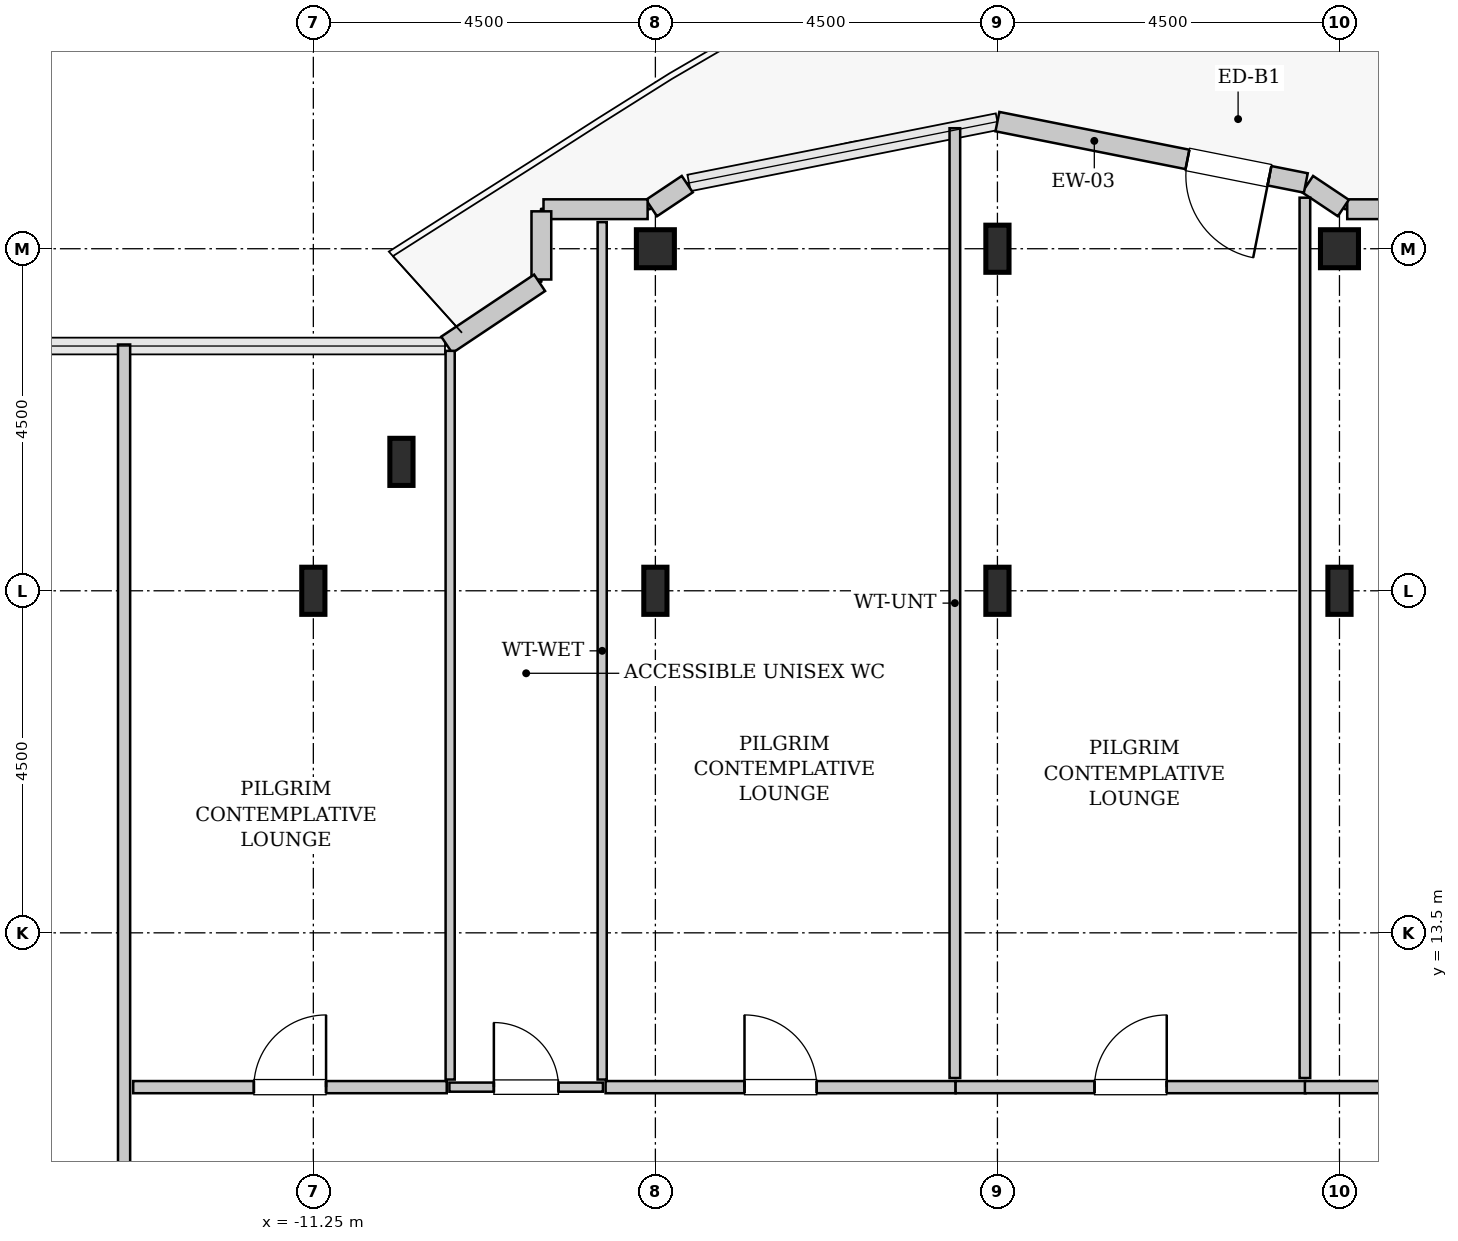
"""IFC4 building model, lengths in metres.
Left out: names, types, materials, properties, quantities, classifications, styles, units other than length and angle.
Written with IfcOpenShell. Run it as: python <this file> out.ifc"""

import sys

from ifc_helpers import new_model, si_unit, direction, frame, frame_2d, origin, origin_2d, place, context, subcontext, project, spatial, rectangle, hollow_rectangle, i_section, extrude, source, transform, mapped, element, fill, save


model = new_model("IFC4")
c1 = context("Model", 3, precision=1e-05, world=origin(), true_north=direction((0.0, 1.0)))
c2 = subcontext(c1, "Body", "Model", "MODEL_VIEW")
j1 = project(units=[si_unit("LENGTHUNIT", "METRE"), si_unit("PLANEANGLEUNIT", "RADIAN")], contexts=[c1])
p1 = place(None, origin())
s1 = spatial("IfcSite", under=j1, at=p1, CompositionType="ELEMENT")
p2 = place(p1, origin())
s2 = spatial("IfcBuilding", under=s1, at=p2, CompositionType="ELEMENT")
p3 = place(p2, frame((0.0, 0.0, 295.0)))
s3 = spatial("IfcBuildingStorey", under=s2, at=p3, CompositionType="ELEMENT", Elevation=295.0)
m1 = source(origin(), c2, "Body", "SweptSolid", [
    extrude(i_section(OverallWidth=0.305, OverallDepth=0.62, WebThickness=0.021, FlangeThickness=0.04, FilletRadius=0.027, at=origin_2d()), origin(), (0.0, 0.0, 1.0), 3.8),
])
for number, where, z_axis, x_axis in (
    (1, (-11.25, 18.0, 0.0), (0.0, 0.0, 1.0), (1.0, 0.0, 0.0)),
    (2, (-10.091, 19.696, 0.0), (0.0, 0.0, 1.0), (1.0, 0.0, 0.0)),
    (3, (-6.75, 18.0, 0.0), (0.0, 0.0, 1.0), (1.0, 0.0, 0.0)),
):
    element("IfcColumn", number, at=place(p3, frame(where, z_axis=z_axis, x_axis=x_axis)), inside=s3, PredefinedType="COLUMN", context=c2, shape_type="MappedRepresentation", body=[
        mapped(m1, transform((0.0, 0.0, 0.0), x_axis=(1.0, 0.0, 0.0), y_axis=(0.0, 1.0, 0.0), z_axis=(0.0, 0.0, 1.0), scale=1.0)),
    ])
m2 = source(origin(), c2, "Body", "SweptSolid", [
    extrude(hollow_rectangle(XDim=0.5, YDim=0.5, WallThickness=0.025, InnerFilletRadius=0.025, OuterFilletRadius=0.05, at=origin_2d()), origin(), (0.0, 0.0, 1.0), 3.8),
])
p4 = place(p3, frame((-6.75, 22.5, 0.0), z_axis=(0.0, 0.0, 1.0), x_axis=(1.0, 0.0, 0.0)))
e4 = element("IfcColumn", 4, at=p4, inside=s3, PredefinedType="COLUMN", context=c2, shape_type="MappedRepresentation", body=[
    mapped(m2, transform((0.0, 0.0, 0.0), x_axis=(1.0, 0.0, 0.0), y_axis=(0.0, 1.0, 0.0), z_axis=(0.0, 0.0, 1.0), scale=1.0)),
])
for number, where, z_axis, x_axis in (
    (5, (-2.25, 18.0, 0.0), (0.0, 0.0, 1.0), (1.0, 0.0, 0.0)),
    (6, (-2.25, 22.5, 0.0), (0.0, 0.0, 1.0), (1.0, 0.0, 0.0)),
    (7, (2.25, 18.0, 0.0), (0.0, 0.0, 1.0), (1.0, 0.0, 0.0)),
):
    element("IfcColumn", number, at=place(p3, frame(where, z_axis=z_axis, x_axis=x_axis)), inside=s3, PredefinedType="COLUMN", context=c2, shape_type="MappedRepresentation", body=[
        mapped(m1, transform((0.0, 0.0, 0.0), x_axis=(1.0, 0.0, 0.0), y_axis=(0.0, 1.0, 0.0), z_axis=(0.0, 0.0, 1.0), scale=1.0)),
    ])
p5 = place(p3, frame((2.25, 22.5, 0.0), z_axis=(0.0, 0.0, 1.0), x_axis=(1.0, 0.0, 0.0)))
e8 = element("IfcColumn", 8, at=p5, inside=s3, PredefinedType="COLUMN", context=c2, shape_type="MappedRepresentation", body=[
    mapped(m2, transform((0.0, 0.0, 0.0), x_axis=(1.0, 0.0, 0.0), y_axis=(0.0, 1.0, 0.0), z_axis=(0.0, 0.0, 1.0), scale=1.0)),
])
m3 = source(origin(), c2, "Body", "SweptSolid", [
    extrude(rectangle(XDim=1.37, YDim=0.26, at=frame_2d((0.685, 0.0))), origin(), (0.0, 0.0, 1.0), 3.55),
])
p6 = place(p3, frame((3.722, 23.02, 0.0), z_axis=(0.0, 0.0, 1.0), x_axis=(-1.0, 0.0, 0.0)))
e9 = element("IfcWall", 9, at=p6, inside=s3, PredefinedType="SOLIDWALL", context=c2, shape_type="MappedRepresentation", body=[
    mapped(m3, transform((0.0, 0.0, 0.0), x_axis=(1.0, 0.0, 0.0), y_axis=(0.0, 1.0, 0.0), z_axis=(0.0, 0.0, 1.0), scale=1.0)),
])
m4 = source(origin(), c2, "Body", "SweptSolid", [
    extrude(rectangle(XDim=0.565, YDim=0.26, at=frame_2d((0.283, 0.0))), origin(), (0.0, 0.0, 1.0), 3.55),
])
p7 = place(p3, frame((2.301, 23.036, 0.0), z_axis=(0.0, 0.0, 1.0), x_axis=(-0.831651492666, 0.555297933317, 0.0)))
e10 = element("IfcWall", 10, at=p7, inside=s3, PredefinedType="SOLIDWALL", context=c2, shape_type="MappedRepresentation", body=[
    mapped(m4, transform((0.0, 0.0, 0.0), x_axis=(1.0, 0.0, 0.0), y_axis=(0.0, 1.0, 0.0), z_axis=(0.0, 0.0, 1.0), scale=1.0)),
])
m5 = source(origin(), c2, "Body", "SweptSolid", [
    extrude(rectangle(XDim=4.137, YDim=0.26, at=frame_2d((2.068, 0.0))), origin(), (0.0, 0.0, 1.0), 3.55),
])
p8 = place(p3, frame((1.807, 23.365, 0.0), z_axis=(0.0, 0.0, 1.0), x_axis=(-0.980782170794, 0.195105954428, 0.0)))
e11 = element("IfcWall", 11, at=p8, inside=s3, PredefinedType="SOLIDWALL", context=c2, shape_type="MappedRepresentation", body=[
    mapped(m5, transform((0.0, 0.0, 0.0), x_axis=(1.0, 0.0, 0.0), y_axis=(0.0, 1.0, 0.0), z_axis=(0.0, 0.0, 1.0), scale=1.0)),
])
p9 = place(p8, frame((0.488, 0.0, 0.0)))
e12 = element("IfcOpeningElement", 12, at=p9, cuts=e11, PredefinedType="OPENING", context=c2, shape_type="SweptSolid", body=[
    extrude(rectangle(XDim=1.1, YDim=2.2, at=frame_2d((0.55, 1.1))), frame((0.0, 0.14, 0.0), z_axis=(0.0, -1.0, 0.0), x_axis=(1.0, 0.0, 0.0)), (0.0, 0.0, 1.0), 0.28),
])
p10 = place(p3, frame((-6.331, 23.35, 0.0), z_axis=(0.0, 0.0, 1.0), x_axis=(-0.831651492666, -0.555297933317, 0.0)))
e13 = element("IfcWall", 13, at=p10, inside=s3, PredefinedType="SOLIDWALL", context=c2, shape_type="MappedRepresentation", body=[
    mapped(m4, transform((0.0, 0.0, 0.0), x_axis=(1.0, 0.0, 0.0), y_axis=(0.0, 1.0, 0.0), z_axis=(0.0, 0.0, 1.0), scale=1.0)),
])
p11 = place(p3, frame((-6.852, 23.02, 0.0), z_axis=(0.0, 0.0, 1.0), x_axis=(-1.0, 0.0, 0.0)))
e14 = element("IfcWall", 14, at=p11, inside=s3, PredefinedType="SOLIDWALL", context=c2, shape_type="MappedRepresentation", body=[
    mapped(m3, transform((0.0, 0.0, 0.0), x_axis=(1.0, 0.0, 0.0), y_axis=(0.0, 1.0, 0.0), z_axis=(0.0, 0.0, 1.0), scale=1.0)),
])
m6 = source(origin(), c2, "Body", "SweptSolid", [
    extrude(rectangle(XDim=0.897, YDim=0.26, at=frame_2d((0.448, 0.0))), origin(), (0.0, 0.0, 1.0), 3.55),
])
p12 = place(p3, frame((-8.25, 22.992, 0.0), z_axis=(0.0, 0.0, 1.0), x_axis=(0.0, -1.0, 0.0)))
e15 = element("IfcWall", 15, at=p12, inside=s3, PredefinedType="SOLIDWALL", context=c2, shape_type="MappedRepresentation", body=[
    mapped(m6, transform((0.0, 0.0, 0.0), x_axis=(1.0, 0.0, 0.0), y_axis=(0.0, 1.0, 0.0), z_axis=(0.0, 0.0, 1.0), scale=1.0)),
])
m7 = source(origin(), c2, "Body", "SweptSolid", [
    extrude(rectangle(XDim=1.469, YDim=0.26, at=frame_2d((0.734, 0.0))), origin(), (0.0, 0.0, 1.0), 3.55),
])
p13 = place(p3, frame((-8.273, 22.052, 0.0), z_axis=(0.0, 0.0, 1.0), x_axis=(-0.831461760506, -0.555581983884, 0.0)))
e16 = element("IfcWall", 16, at=p13, inside=s3, PredefinedType="SOLIDWALL", context=c2, shape_type="MappedRepresentation", body=[
    mapped(m7, transform((0.0, 0.0, 0.0), x_axis=(1.0, 0.0, 0.0), y_axis=(0.0, 1.0, 0.0), z_axis=(0.0, 0.0, 1.0), scale=1.0)),
])
m8 = source(origin(), c2, "Body", "SweptSolid", [
    extrude(rectangle(XDim=2.02, YDim=0.12, at=frame_2d((1.01, 0.0))), origin(), (0.0, 0.0, 1.0), 3.535),
])
p14 = place(p3, frame((-9.46, 11.47, 0.0), z_axis=(0.0, 0.0, 1.0), x_axis=(1.0, 0.0, 0.0)))
e17 = element("IfcWall", 17, at=p14, inside=s3, PredefinedType="PLUMBINGWALL", context=c2, shape_type="MappedRepresentation", body=[
    mapped(m8, transform((0.0, 0.0, 0.0), x_axis=(1.0, 0.0, 0.0), y_axis=(0.0, 1.0, 0.0), z_axis=(0.0, 0.0, 1.0), scale=1.0)),
])
p15 = place(p14, frame((0.585, 0.0, 0.0)))
e18 = element("IfcOpeningElement", 18, at=p15, cuts=e17, PredefinedType="OPENING", context=c2, shape_type="SweptSolid", body=[
    extrude(rectangle(XDim=0.85, YDim=2.1, at=frame_2d((0.425, 1.05))), frame((0.0, 0.07, 0.0), z_axis=(0.0, -1.0, 0.0), x_axis=(1.0, 0.0, 0.0)), (0.0, 0.0, 1.0), 0.14),
])
m9 = source(origin(), c2, "Body", "SweptSolid", [
    extrude(rectangle(XDim=11.28, YDim=0.12, at=frame_2d((5.64, 0.0))), origin(), (0.0, 0.0, 1.0), 3.535),
])
p16 = place(p3, frame((-7.45, 11.57, 0.0), z_axis=(0.0, 0.0, 1.0), x_axis=(0.0, 1.0, 0.0)))
e19 = element("IfcWall", 19, at=p16, inside=s3, PredefinedType="PLUMBINGWALL", context=c2, shape_type="MappedRepresentation", body=[
    mapped(m9, transform((0.0, 0.0, 0.0), x_axis=(1.0, 0.0, 0.0), y_axis=(0.0, 1.0, 0.0), z_axis=(0.0, 0.0, 1.0), scale=1.0)),
])
m10 = source(origin(), c2, "Body", "SweptSolid", [
    extrude(rectangle(XDim=9.587, YDim=0.12, at=frame_2d((4.793, 0.0))), origin(), (0.0, 0.0, 1.0), 3.535),
])
p17 = place(p3, frame((-9.45, 11.57, 0.0), z_axis=(0.0, 0.0, 1.0), x_axis=(0.0, 1.0, 0.0)))
e20 = element("IfcWall", 20, at=p17, inside=s3, PredefinedType="PLUMBINGWALL", context=c2, shape_type="MappedRepresentation", body=[
    mapped(m10, transform((0.0, 0.0, 0.0), x_axis=(1.0, 0.0, 0.0), y_axis=(0.0, 1.0, 0.0), z_axis=(0.0, 0.0, 1.0), scale=1.0)),
])
m11 = source(origin(), c2, "Body", "SweptSolid", [
    extrude(rectangle(XDim=12.752, YDim=0.16, at=frame_2d((6.376, 0.0))), origin(), (0.0, 0.0, 1.0), 3.535),
])
p18 = place(p3, frame((-13.74, 8.488, 0.0), z_axis=(0.0, 0.0, 1.0), x_axis=(0.0, 1.0, 0.0)))
e21 = element("IfcWall", 21, at=p18, inside=s3, PredefinedType="PARTITIONING", context=c2, shape_type="MappedRepresentation", body=[
    mapped(m11, transform((0.0, 0.0, 0.0), x_axis=(1.0, 0.0, 0.0), y_axis=(0.0, 1.0, 0.0), z_axis=(0.0, 0.0, 1.0), scale=1.0)),
])
p19 = place(p18, frame((1.036, 0.0, 0.0)))
e22 = element("IfcOpeningElement", 22, at=p19, cuts=e21, PredefinedType="OPENING", context=c2, shape_type="SweptSolid", body=[
    extrude(rectangle(XDim=0.95, YDim=2.1, at=frame_2d((0.475, 1.05))), frame((0.0, 0.09, 0.0), z_axis=(0.0, -1.0, 0.0), x_axis=(1.0, 0.0, 0.0)), (0.0, 0.0, 1.0), 0.18),
])
m12 = source(origin(), c2, "Body", "SweptSolid", [
    extrude(rectangle(XDim=4.125, YDim=0.16, at=frame_2d((2.062, 0.0))), origin(), (0.0, 0.0, 1.0), 3.535),
])
p20 = place(p3, frame((-13.62, 11.47, 0.0), z_axis=(0.0, 0.0, 1.0), x_axis=(1.0, 0.0, 0.0)))
e23 = element("IfcWall", 23, at=p20, inside=s3, PredefinedType="PARTITIONING", context=c2, shape_type="MappedRepresentation", body=[
    mapped(m12, transform((0.0, 0.0, 0.0), x_axis=(1.0, 0.0, 0.0), y_axis=(0.0, 1.0, 0.0), z_axis=(0.0, 0.0, 1.0), scale=1.0)),
])
p21 = place(p20, frame((1.587, 0.0, 0.0)))
e24 = element("IfcOpeningElement", 24, at=p21, cuts=e23, PredefinedType="OPENING", context=c2, shape_type="SweptSolid", body=[
    extrude(rectangle(XDim=0.95, YDim=2.1, at=frame_2d((0.475, 1.05))), frame((0.0, 0.09, 0.0), z_axis=(0.0, -1.0, 0.0), x_axis=(1.0, 0.0, 0.0)), (0.0, 0.0, 1.0), 0.18),
])
m13 = source(origin(), c2, "Body", "SweptSolid", [
    extrude(rectangle(XDim=4.605, YDim=0.16, at=frame_2d((2.302, 0.0))), origin(), (0.0, 0.0, 1.0), 3.535),
])
p22 = place(p3, frame((-7.405, 11.47, 0.0), z_axis=(0.0, 0.0, 1.0), x_axis=(1.0, 0.0, 0.0)))
e25 = element("IfcWall", 25, at=p22, inside=s3, PredefinedType="PARTITIONING", context=c2, shape_type="MappedRepresentation", body=[
    mapped(m13, transform((0.0, 0.0, 0.0), x_axis=(1.0, 0.0, 0.0), y_axis=(0.0, 1.0, 0.0), z_axis=(0.0, 0.0, 1.0), scale=1.0)),
])
p23 = place(p22, frame((1.827, 0.0, 0.0)))
e26 = element("IfcOpeningElement", 26, at=p23, cuts=e25, PredefinedType="OPENING", context=c2, shape_type="SweptSolid", body=[
    extrude(rectangle(XDim=0.95, YDim=2.1, at=frame_2d((0.475, 1.05))), frame((0.0, 0.09, 0.0), z_axis=(0.0, -1.0, 0.0), x_axis=(1.0, 0.0, 0.0)), (0.0, 0.0, 1.0), 0.18),
])
m14 = source(origin(), c2, "Body", "SweptSolid", [
    extrude(rectangle(XDim=12.495, YDim=0.14, at=frame_2d((6.248, 0.0))), origin(), (0.0, 0.0, 1.0), 3.535),
])
p24 = place(p3, frame((-2.81, 11.59, 0.0), z_axis=(0.0, 0.0, 1.0), x_axis=(0.0, 1.0, 0.0)))
e27 = element("IfcWall", 27, at=p24, inside=s3, PredefinedType="PARTITIONING", context=c2, shape_type="MappedRepresentation", body=[
    mapped(m14, transform((0.0, 0.0, 0.0), x_axis=(1.0, 0.0, 0.0), y_axis=(0.0, 1.0, 0.0), z_axis=(0.0, 0.0, 1.0), scale=1.0)),
])
p25 = place(p3, frame((-2.8, 11.47, 0.0), z_axis=(0.0, 0.0, 1.0), x_axis=(1.0, 0.0, 0.0)))
e28 = element("IfcWall", 28, at=p25, inside=s3, PredefinedType="PARTITIONING", context=c2, shape_type="MappedRepresentation", body=[
    mapped(m13, transform((0.0, 0.0, 0.0), x_axis=(1.0, 0.0, 0.0), y_axis=(0.0, 1.0, 0.0), z_axis=(0.0, 0.0, 1.0), scale=1.0)),
])
p26 = place(p25, frame((1.827, 0.0, 0.0)))
e29 = element("IfcOpeningElement", 29, at=p26, cuts=e28, PredefinedType="OPENING", context=c2, shape_type="SweptSolid", body=[
    extrude(rectangle(XDim=0.95, YDim=2.1, at=frame_2d((0.475, 1.05))), frame((0.0, 0.09, 0.0), z_axis=(0.0, -1.0, 0.0), x_axis=(1.0, 0.0, 0.0)), (0.0, 0.0, 1.0), 0.18),
])
m15 = source(origin(), c2, "Body", "SweptSolid", [
    extrude(rectangle(XDim=11.581, YDim=0.14, at=frame_2d((5.791, 0.0))), origin(), (0.0, 0.0, 1.0), 2.925),
])
p27 = place(p3, frame((1.795, 11.59, 0.0), z_axis=(0.0, 0.0, 1.0), x_axis=(0.0, 1.0, 0.0)))
e30 = element("IfcWall", 30, at=p27, inside=s3, PredefinedType="PARTITIONING", context=c2, shape_type="MappedRepresentation", body=[
    mapped(m15, transform((0.0, 0.0, 0.0), x_axis=(1.0, 0.0, 0.0), y_axis=(0.0, 1.0, 0.0), z_axis=(0.0, 0.0, 1.0), scale=1.0)),
])
m16 = source(origin(), c2, "Body", "SweptSolid", [
    extrude(rectangle(XDim=6.01, YDim=0.16, at=frame_2d((3.005, 0.0))), origin(), (0.0, 0.0, 1.0), 3.535),
])
p28 = place(p3, frame((1.795, 11.47, 0.0), z_axis=(0.0, 0.0, 1.0), x_axis=(1.0, 0.0, 0.0)))
e31 = element("IfcWall", 31, at=p28, inside=s3, PredefinedType="PARTITIONING", context=c2, shape_type="MappedRepresentation", body=[
    mapped(m16, transform((0.0, 0.0, 0.0), x_axis=(1.0, 0.0, 0.0), y_axis=(0.0, 1.0, 0.0), z_axis=(0.0, 0.0, 1.0), scale=1.0)),
])
p29 = place(p28, frame((2.53, 0.0, 0.0)))
e32 = element("IfcOpeningElement", 32, at=p29, cuts=e31, PredefinedType="OPENING", context=c2, shape_type="SweptSolid", body=[
    extrude(rectangle(XDim=0.95, YDim=2.1, at=frame_2d((0.475, 1.05))), frame((0.0, 0.09, 0.0), z_axis=(0.0, -1.0, 0.0), x_axis=(1.0, 0.0, 0.0)), (0.0, 0.0, 1.0), 0.18),
])
m17 = source(origin(), c2, "Body", "SweptSolid", [
    extrude(rectangle(XDim=1.1, YDim=2.2, at=frame_2d((0.55, 1.1))), frame((0.0, 0.025, 0.0), z_axis=(0.0, -1.0, 0.0), x_axis=(1.0, 0.0, 0.0)), (0.0, 0.0, 1.0), 0.05),
])
p30 = place(p9, origin())
e33 = element("IfcDoor", 33, at=p30, inside=s3, OperationType="SINGLE_SWING_LEFT", PredefinedType="DOOR", context=c2, shape_type="MappedRepresentation", body=[
    mapped(m17, transform((0.0, 0.0, 0.0), x_axis=(1.0, 0.0, 0.0), y_axis=(0.0, 1.0, 0.0), z_axis=(0.0, 0.0, 1.0), scale=1.0)),
])
fill(e12, e33)
m18 = source(origin(), c2, "Body", "SweptSolid", [
    extrude(rectangle(XDim=0.85, YDim=2.1, at=frame_2d((0.425, 1.05))), frame((0.0, 0.025, 0.0), z_axis=(0.0, -1.0, 0.0), x_axis=(1.0, 0.0, 0.0)), (0.0, 0.0, 1.0), 0.05),
])
p31 = place(p15, origin())
e34 = element("IfcDoor", 34, at=p31, inside=s3, OperationType="SINGLE_SWING_LEFT", PredefinedType="DOOR", context=c2, shape_type="MappedRepresentation", body=[
    mapped(m18, transform((0.0, 0.0, 0.0), x_axis=(1.0, 0.0, 0.0), y_axis=(0.0, 1.0, 0.0), z_axis=(0.0, 0.0, 1.0), scale=1.0)),
])
fill(e18, e34)
m19 = source(origin(), c2, "Body", "SweptSolid", [
    extrude(rectangle(XDim=0.95, YDim=2.1, at=frame_2d((0.475, 1.05))), frame((0.0, 0.025, 0.0), z_axis=(0.0, -1.0, 0.0), x_axis=(1.0, 0.0, 0.0)), (0.0, 0.0, 1.0), 0.05),
])
p32 = place(p21, origin())
e35 = element("IfcDoor", 35, at=p32, inside=s3, OperationType="SINGLE_SWING_RIGHT", PredefinedType="DOOR", context=c2, shape_type="MappedRepresentation", body=[
    mapped(m19, transform((0.0, 0.0, 0.0), x_axis=(1.0, 0.0, 0.0), y_axis=(0.0, 1.0, 0.0), z_axis=(0.0, 0.0, 1.0), scale=1.0)),
])
fill(e24, e35)
p33 = place(p23, origin())
e36 = element("IfcDoor", 36, at=p33, inside=s3, OperationType="SINGLE_SWING_LEFT", PredefinedType="DOOR", context=c2, shape_type="MappedRepresentation", body=[
    mapped(m19, transform((0.0, 0.0, 0.0), x_axis=(1.0, 0.0, 0.0), y_axis=(0.0, 1.0, 0.0), z_axis=(0.0, 0.0, 1.0), scale=1.0)),
])
fill(e26, e36)
p34 = place(p26, origin())
e37 = element("IfcDoor", 37, at=p34, inside=s3, OperationType="SINGLE_SWING_RIGHT", PredefinedType="DOOR", context=c2, shape_type="MappedRepresentation", body=[
    mapped(m19, transform((0.0, 0.0, 0.0), x_axis=(1.0, 0.0, 0.0), y_axis=(0.0, 1.0, 0.0), z_axis=(0.0, 0.0, 1.0), scale=1.0)),
])
fill(e29, e37)
save(model, sys.argv[1])
